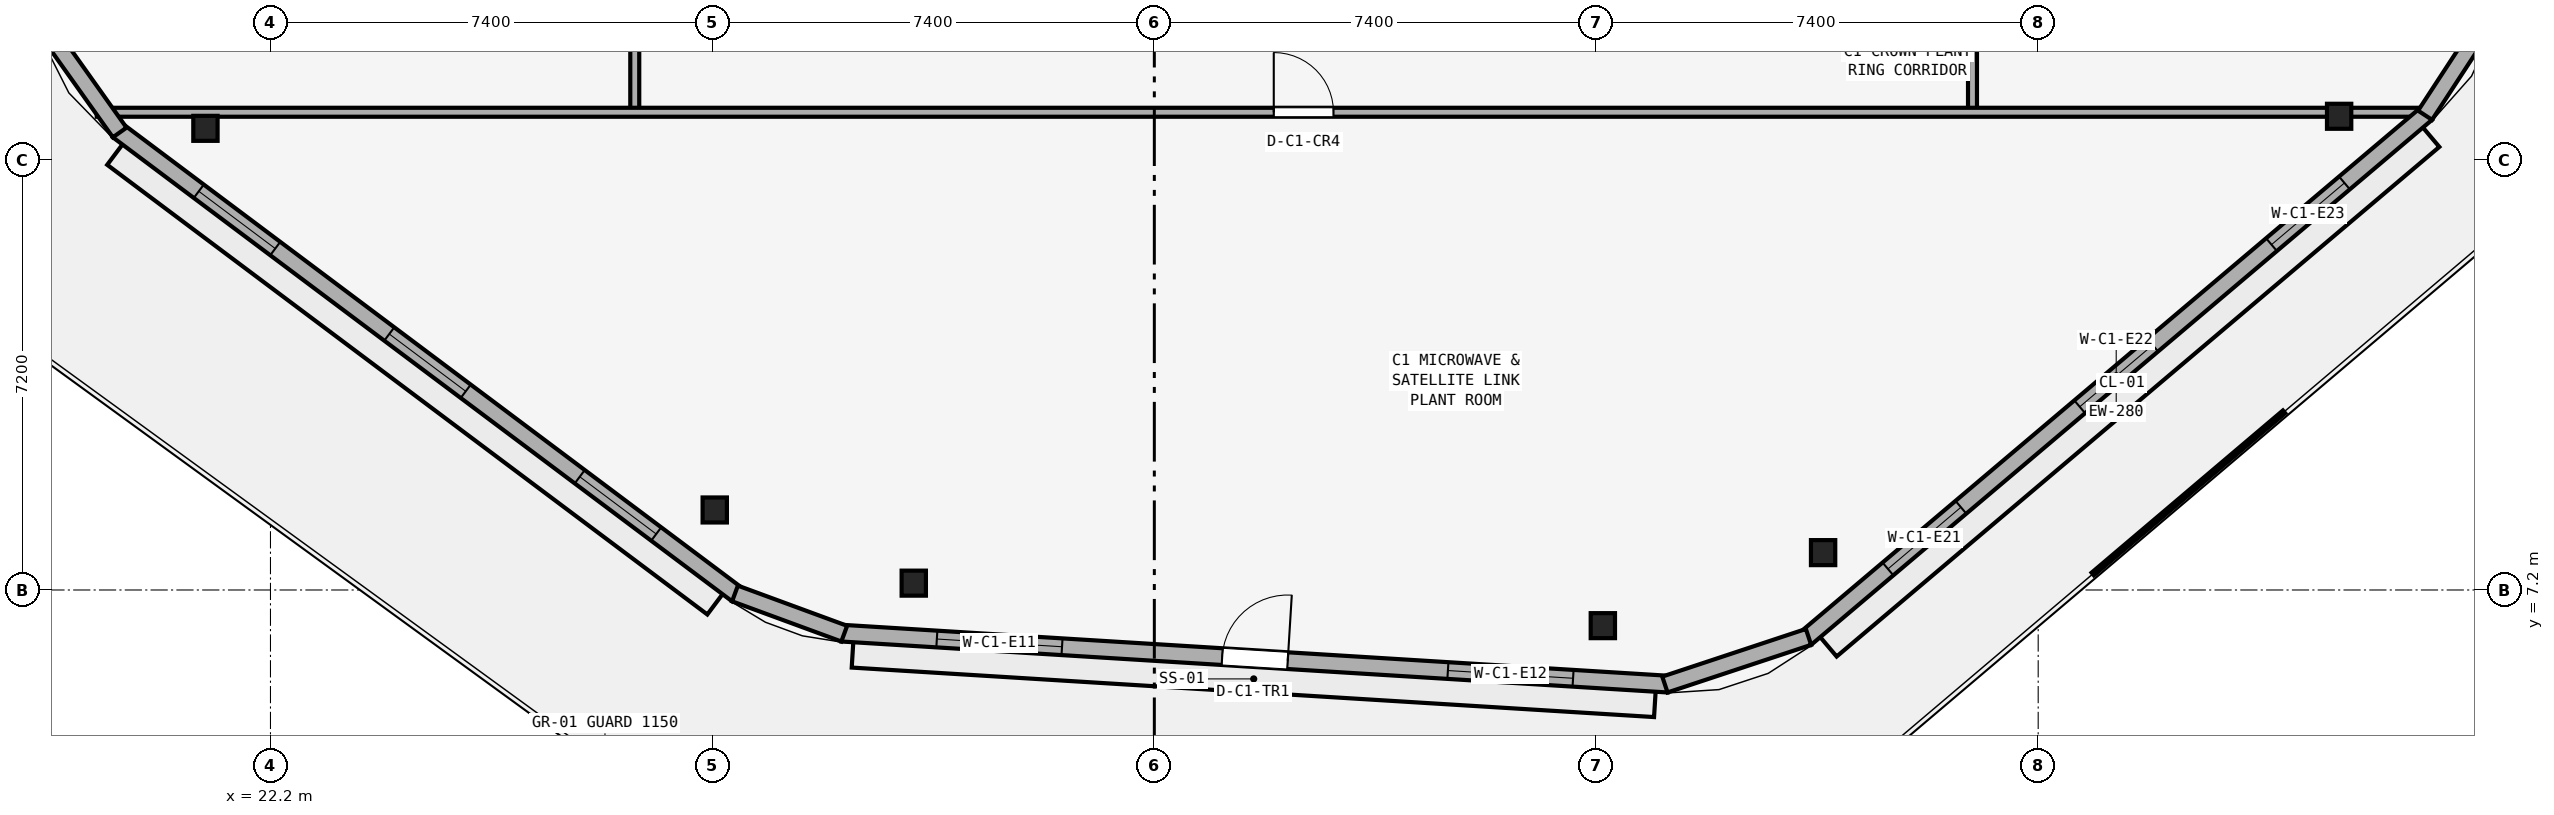
"""IFC4 building model, lengths in metres.
Left out: names, types, materials, properties, quantities, classifications, styles, units other than length and angle.
Written with IfcOpenShell. Run it as: python <this file> out.ifc"""

import sys

from ifc_helpers import new_model, si_unit, direction, frame, frame_2d, origin, origin_2d, place, context, subcontext, project, spatial, rectangle, i_section, extrude, element, fill, save


model = new_model("IFC4")
c1 = context("Model", 3, precision=1e-05, world=origin(), true_north=direction((0.0, 1.0)))
c2 = subcontext(c1, "Body", "Model", "MODEL_VIEW")
j1 = project(units=[si_unit("LENGTHUNIT", "METRE"), si_unit("PLANEANGLEUNIT", "RADIAN")], contexts=[c1])
p1 = place(None, origin())
s1 = spatial("IfcSite", under=j1, at=p1, CompositionType="ELEMENT")
p2 = place(p1, origin())
s2 = spatial("IfcBuilding", under=s1, at=p2, CompositionType="ELEMENT")
p3 = place(p2, frame((0.0, 0.0, 313.4)))
s3 = spatial("IfcBuildingStorey", under=s2, at=p3, CompositionType="ELEMENT", Elevation=313.4)
for number, where, z_axis, x_axis in (
    (1, (32.972, 7.315, 0.0), (0.0, 0.0, 1.0), (1.0, 0.0, 0.0)),
    (2, (44.51, 6.603, 0.0), (0.0, 0.0, 1.0), (1.0, 0.0, 0.0)),
    (3, (48.198, 7.826, 0.0), (0.0, 0.0, 1.0), (1.0, 0.0, 0.0)),
    (4, (56.839, 15.133, 0.0), (0.0, 0.0, 1.0), (1.0, 0.0, 0.0)),
    (5, (21.111, 14.931, 0.0), (0.0, 0.0, 1.0), (1.0, 0.0, 0.0)),
    (6, (29.639, 8.54, 0.0), (0.0, 0.0, 1.0), (1.0, 0.0, 0.0)),
):
    element("IfcColumn", number, at=place(p3, frame(where, z_axis=z_axis, x_axis=x_axis)), inside=s3, PredefinedType="COLUMN", context=c2, shape_type="SweptSolid", body=[
        extrude(i_section(OverallWidth=0.407, OverallDepth=0.419, WebThickness=0.031, FlangeThickness=0.049, at=origin_2d()), origin(), (0.0, 0.0, 1.0), 4.0),
    ])
p4 = place(p3, frame((50.7, 15.2, 0.0), z_axis=(0.0, 0.0, 1.0), x_axis=(0.0, 1.0, 0.0)))
e7 = element("IfcWall", 7, at=p4, inside=s3, PredefinedType="PARTITIONING", context=c2, shape_type="SweptSolid", body=[
    extrude(rectangle(XDim=20.0, YDim=0.15, at=frame_2d((10.0, 0.0))), origin(), (0.0, 0.0, 1.0), 3.72),
])
p5 = place(p4, frame((9.5, 0.0, 0.0)))
e8 = element("IfcOpeningElement", 8, at=p5, cuts=e7, PredefinedType="OPENING", context=c2, shape_type="SweptSolid", body=[
    extrude(rectangle(XDim=1.0, YDim=2.12, at=frame_2d((0.5, 1.06))), frame((0.0, 0.085, 0.0), z_axis=(0.0, -1.0, 0.0), x_axis=(1.0, 0.0, 0.0)), (0.0, 0.0, 1.0), 0.17),
])
p6 = place(p3, frame((28.3, 15.2, 0.0), z_axis=(0.0, 0.0, 1.0), x_axis=(0.0, 1.0, 0.0)))
e9 = element("IfcWall", 9, at=p6, inside=s3, PredefinedType="PARTITIONING", context=c2, shape_type="SweptSolid", body=[
    extrude(rectangle(XDim=20.0, YDim=0.15, at=frame_2d((10.0, 0.0))), origin(), (0.0, 0.0, 1.0), 3.72),
])
p7 = place(p6, frame((9.5, 0.0, 0.0)))
e10 = element("IfcOpeningElement", 10, at=p7, cuts=e9, PredefinedType="OPENING", context=c2, shape_type="SweptSolid", body=[
    extrude(rectangle(XDim=1.0, YDim=2.12, at=frame_2d((0.5, 1.06))), frame((0.0, 0.085, 0.0), z_axis=(0.0, -1.0, 0.0), x_axis=(1.0, 0.0, 0.0)), (0.0, 0.0, 1.0), 0.17),
])
p8 = place(p3, frame((19.292, 15.2, 0.0), z_axis=(0.0, 0.0, 1.0), x_axis=(1.0, 0.0, 0.0)))
e11 = element("IfcWall", 11, at=p8, inside=s3, PredefinedType="PARTITIONING", context=c2, shape_type="SweptSolid", body=[
    extrude(rectangle(XDim=39.076, YDim=0.15, at=frame_2d((19.538, 0.0))), origin(), (0.0, 0.0, 1.0), 3.103),
])
p9 = place(p8, frame((19.708, 0.0, 0.0)))
e12 = element("IfcOpeningElement", 12, at=p9, cuts=e11, PredefinedType="OPENING", context=c2, shape_type="SweptSolid", body=[
    extrude(rectangle(XDim=1.0, YDim=2.12, at=frame_2d((0.5, 1.06))), frame((0.0, 0.085, 0.0), z_axis=(0.0, -1.0, 0.0), x_axis=(1.0, 0.0, 0.0)), (0.0, 0.0, 1.0), 0.17),
])
p10 = place(p3, frame((31.768, 6.477, 0.0), z_axis=(0.0, 0.0, 1.0), x_axis=(0.998103304461, -0.061561299728, 0.0)))
e13 = element("IfcWall", 13, at=p10, inside=s3, PredefinedType="STANDARD", context=c2, shape_type="SweptSolid", body=[
    extrude(rectangle(XDim=13.861, YDim=0.28, at=frame_2d((6.93, 0.0))), origin(), (0.0, 0.0, 1.0), 3.72),
])
p11 = place(p10, frame((6.38, 0.0, 0.0)))
e14 = element("IfcOpeningElement", 14, at=p11, cuts=e13, PredefinedType="OPENING", context=c2, shape_type="SweptSolid", body=[
    extrude(rectangle(XDim=1.1, YDim=2.2, at=frame_2d((0.55, 1.1))), frame((0.0, 0.15, 0.0), z_axis=(0.0, -1.0, 0.0), x_axis=(1.0, 0.0, 0.0)), (0.0, 0.0, 1.0), 0.3),
])
p12 = place(p10, frame((1.594, 0.0, 0.9)))
e15 = element("IfcOpeningElement", 15, at=p12, cuts=e13, PredefinedType="OPENING", context=c2, shape_type="SweptSolid", body=[
    extrude(rectangle(XDim=2.1, YDim=1.7, at=frame_2d((1.05, 0.85))), frame((0.0, 0.15, 0.0), z_axis=(0.0, -1.0, 0.0), x_axis=(1.0, 0.0, 0.0)), (0.0, 0.0, 1.0), 0.3),
])
p13 = place(p10, frame((10.167, 0.0, 0.9)))
e16 = element("IfcOpeningElement", 16, at=p13, cuts=e13, PredefinedType="OPENING", context=c2, shape_type="SweptSolid", body=[
    extrude(rectangle(XDim=2.1, YDim=1.7, at=frame_2d((1.05, 0.85))), frame((0.0, 0.15, 0.0), z_axis=(0.0, -1.0, 0.0), x_axis=(1.0, 0.0, 0.0)), (0.0, 0.0, 1.0), 0.3),
])
p14 = place(p3, frame((47.908, 6.388, 0.0), z_axis=(0.0, 0.0, 1.0), x_axis=(0.763574643448, 0.645719570621, 0.0)))
e17 = element("IfcWall", 17, at=p14, inside=s3, PredefinedType="STANDARD", context=c2, shape_type="SweptSolid", body=[
    extrude(rectangle(XDim=13.616, YDim=0.28, at=frame_2d((6.808, 0.0))), origin(), (0.0, 0.0, 1.0), 3.72),
])
p15 = place(p14, frame((1.803, 0.0, 0.9)))
e18 = element("IfcOpeningElement", 18, at=p15, cuts=e17, PredefinedType="OPENING", context=c2, shape_type="SweptSolid", body=[
    extrude(rectangle(XDim=1.6, YDim=1.45, at=frame_2d((0.8, 0.725))), frame((0.0, 0.15, 0.0), z_axis=(0.0, -1.0, 0.0), x_axis=(1.0, 0.0, 0.0)), (0.0, 0.0, 1.0), 0.3),
])
p16 = place(p14, frame((6.008, 0.0, 0.9)))
e19 = element("IfcOpeningElement", 19, at=p16, cuts=e17, PredefinedType="OPENING", context=c2, shape_type="SweptSolid", body=[
    extrude(rectangle(XDim=1.6, YDim=1.45, at=frame_2d((0.8, 0.725))), frame((0.0, 0.15, 0.0), z_axis=(0.0, -1.0, 0.0), x_axis=(1.0, 0.0, 0.0)), (0.0, 0.0, 1.0), 0.3),
])
p17 = place(p14, frame((10.213, 0.0, 0.9)))
e20 = element("IfcOpeningElement", 20, at=p17, cuts=e17, PredefinedType="OPENING", context=c2, shape_type="SweptSolid", body=[
    extrude(rectangle(XDim=1.6, YDim=1.45, at=frame_2d((0.8, 0.725))), frame((0.0, 0.15, 0.0), z_axis=(0.0, -1.0, 0.0), x_axis=(1.0, 0.0, 0.0)), (0.0, 0.0, 1.0), 0.3),
])
p18 = place(p3, frame((19.645, 14.892, 0.0), z_axis=(0.0, 0.0, 1.0), x_axis=(0.800246388275, -0.599671341697, 0.0)))
e21 = element("IfcWall", 21, at=p18, inside=s3, PredefinedType="STANDARD", context=c2, shape_type="SweptSolid", body=[
    extrude(rectangle(XDim=12.957, YDim=0.28, at=frame_2d((6.479, 0.0))), origin(), (0.0, 0.0, 1.0), 3.72),
])
p19 = place(p18, frame((1.693, 0.0, 0.9)))
e22 = element("IfcOpeningElement", 22, at=p19, cuts=e21, PredefinedType="OPENING", context=c2, shape_type="SweptSolid", body=[
    extrude(rectangle(XDim=1.6, YDim=1.45, at=frame_2d((0.8, 0.725))), frame((0.0, 0.15, 0.0), z_axis=(0.0, -1.0, 0.0), x_axis=(1.0, 0.0, 0.0)), (0.0, 0.0, 1.0), 0.3),
])
p20 = place(p18, frame((5.678, 0.0, 0.9)))
e23 = element("IfcOpeningElement", 23, at=p20, cuts=e21, PredefinedType="OPENING", context=c2, shape_type="SweptSolid", body=[
    extrude(rectangle(XDim=1.6, YDim=1.45, at=frame_2d((0.8, 0.725))), frame((0.0, 0.15, 0.0), z_axis=(0.0, -1.0, 0.0), x_axis=(1.0, 0.0, 0.0)), (0.0, 0.0, 1.0), 0.3),
])
p21 = place(p18, frame((9.664, 0.0, 0.9)))
e24 = element("IfcOpeningElement", 24, at=p21, cuts=e21, PredefinedType="OPENING", context=c2, shape_type="SweptSolid", body=[
    extrude(rectangle(XDim=1.6, YDim=1.45, at=frame_2d((0.8, 0.725))), frame((0.0, 0.15, 0.0), z_axis=(0.0, -1.0, 0.0), x_axis=(1.0, 0.0, 0.0)), (0.0, 0.0, 1.0), 0.3),
])
p22 = place(p3, frame((45.55, 5.617, 0.0), z_axis=(0.0, 0.0, 1.0), x_axis=(0.949173652387, 0.314752883409, 0.0)))
e25 = element("IfcWall", 25, at=p22, inside=s3, PredefinedType="STANDARD", context=c2, shape_type="SweptSolid", body=[
    extrude(rectangle(XDim=2.533, YDim=0.28, at=frame_2d((1.267, 0.0))), origin(), (0.0, 0.0, 1.0), 3.72),
])
p23 = place(p3, frame((58.278, 15.15, 0.0), z_axis=(0.0, 0.0, 1.0), x_axis=(0.547367908429, 0.836892091504, 0.0)))
e26 = element("IfcWall", 26, at=p23, inside=s3, PredefinedType="STANDARD", context=c2, shape_type="SweptSolid", body=[
    extrude(rectangle(XDim=1.942, YDim=0.28, at=frame_2d((0.971, 0.0))), origin(), (0.0, 0.0, 1.0), 3.72),
])
p24 = place(p3, frame((18.475, 16.547, 0.0), z_axis=(0.0, 0.0, 1.0), x_axis=(0.579786647816, -0.814768337022, 0.0)))
e27 = element("IfcWall", 27, at=p24, inside=s3, PredefinedType="STANDARD", context=c2, shape_type="SweptSolid", body=[
    extrude(rectangle(XDim=2.07, YDim=0.28, at=frame_2d((1.035, 0.0))), origin(), (0.0, 0.0, 1.0), 3.72),
])
p25 = place(p3, frame((29.978, 7.142, 0.0), z_axis=(0.0, 0.0, 1.0), x_axis=(0.938529029107, -0.345200320862, 0.0)))
e28 = element("IfcWall", 28, at=p25, inside=s3, PredefinedType="STANDARD", context=c2, shape_type="SweptSolid", body=[
    extrude(rectangle(XDim=1.949, YDim=0.28, at=frame_2d((0.975, 0.0))), origin(), (0.0, 0.0, 1.0), 3.72),
])
p26 = place(p9, origin())
e29 = element("IfcDoor", 29, at=p26, inside=s3, OperationType="SINGLE_SWING_LEFT", PredefinedType="DOOR", context=c2, shape_type="SweptSolid", body=[
    extrude(rectangle(XDim=1.0, YDim=2.12, at=frame_2d((0.5, 1.06))), frame((0.0, 0.025, 0.0), z_axis=(0.0, -1.0, 0.0), x_axis=(1.0, 0.0, 0.0)), (0.0, 0.0, 1.0), 0.05),
])
fill(e12, e29)
p27 = place(p11, origin())
e30 = element("IfcDoor", 30, at=p27, inside=s3, OperationType="SINGLE_SWING_RIGHT", PredefinedType="DOOR", context=c2, shape_type="SweptSolid", body=[
    extrude(rectangle(XDim=1.1, YDim=2.2, at=frame_2d((0.55, 1.1))), frame((0.0, 0.025, 0.0), z_axis=(0.0, -1.0, 0.0), x_axis=(1.0, 0.0, 0.0)), (0.0, 0.0, 1.0), 0.05),
])
fill(e14, e30)
p28 = place(p12, origin())
e31 = element("IfcWindow", 31, at=p28, inside=s3, PartitioningType="SINGLE_PANEL", PredefinedType="WINDOW", context=c2, shape_type="SweptSolid", body=[
    extrude(rectangle(XDim=2.1, YDim=1.7, at=frame_2d((1.05, 0.85))), frame((0.0, 0.03, 0.0), z_axis=(0.0, -1.0, 0.0), x_axis=(1.0, 0.0, 0.0)), (0.0, 0.0, 1.0), 0.06),
])
fill(e15, e31)
p29 = place(p13, origin())
e32 = element("IfcWindow", 32, at=p29, inside=s3, PartitioningType="SINGLE_PANEL", PredefinedType="WINDOW", context=c2, shape_type="SweptSolid", body=[
    extrude(rectangle(XDim=2.1, YDim=1.7, at=frame_2d((1.05, 0.85))), frame((0.0, 0.03, 0.0), z_axis=(0.0, -1.0, 0.0), x_axis=(1.0, 0.0, 0.0)), (0.0, 0.0, 1.0), 0.06),
])
fill(e16, e32)
p30 = place(p15, origin())
e33 = element("IfcWindow", 33, at=p30, inside=s3, PartitioningType="SINGLE_PANEL", PredefinedType="WINDOW", context=c2, shape_type="SweptSolid", body=[
    extrude(rectangle(XDim=1.6, YDim=1.45, at=frame_2d((0.8, 0.725))), frame((0.0, 0.03, 0.0), z_axis=(0.0, -1.0, 0.0), x_axis=(1.0, 0.0, 0.0)), (0.0, 0.0, 1.0), 0.06),
])
fill(e18, e33)
p31 = place(p16, origin())
e34 = element("IfcWindow", 34, at=p31, inside=s3, PartitioningType="SINGLE_PANEL", PredefinedType="WINDOW", context=c2, shape_type="SweptSolid", body=[
    extrude(rectangle(XDim=1.6, YDim=1.45, at=frame_2d((0.8, 0.725))), frame((0.0, 0.03, 0.0), z_axis=(0.0, -1.0, 0.0), x_axis=(1.0, 0.0, 0.0)), (0.0, 0.0, 1.0), 0.06),
])
fill(e19, e34)
p32 = place(p17, origin())
e35 = element("IfcWindow", 35, at=p32, inside=s3, PartitioningType="SINGLE_PANEL", PredefinedType="WINDOW", context=c2, shape_type="SweptSolid", body=[
    extrude(rectangle(XDim=1.6, YDim=1.45, at=frame_2d((0.8, 0.725))), frame((0.0, 0.03, 0.0), z_axis=(0.0, -1.0, 0.0), x_axis=(1.0, 0.0, 0.0)), (0.0, 0.0, 1.0), 0.06),
])
fill(e20, e35)
p33 = place(p19, origin())
e36 = element("IfcWindow", 36, at=p33, inside=s3, PartitioningType="SINGLE_PANEL", PredefinedType="WINDOW", context=c2, shape_type="SweptSolid", body=[
    extrude(rectangle(XDim=1.6, YDim=1.45, at=frame_2d((0.8, 0.725))), frame((0.0, 0.03, 0.0), z_axis=(0.0, -1.0, 0.0), x_axis=(1.0, 0.0, 0.0)), (0.0, 0.0, 1.0), 0.06),
])
fill(e22, e36)
p34 = place(p20, origin())
e37 = element("IfcWindow", 37, at=p34, inside=s3, PartitioningType="SINGLE_PANEL", PredefinedType="WINDOW", context=c2, shape_type="SweptSolid", body=[
    extrude(rectangle(XDim=1.6, YDim=1.45, at=frame_2d((0.8, 0.725))), frame((0.0, 0.03, 0.0), z_axis=(0.0, -1.0, 0.0), x_axis=(1.0, 0.0, 0.0)), (0.0, 0.0, 1.0), 0.06),
])
fill(e23, e37)
p35 = place(p21, origin())
e38 = element("IfcWindow", 38, at=p35, inside=s3, PartitioningType="SINGLE_PANEL", PredefinedType="WINDOW", context=c2, shape_type="SweptSolid", body=[
    extrude(rectangle(XDim=1.6, YDim=1.45, at=frame_2d((0.8, 0.725))), frame((0.0, 0.03, 0.0), z_axis=(0.0, -1.0, 0.0), x_axis=(1.0, 0.0, 0.0)), (0.0, 0.0, 1.0), 0.06),
])
fill(e24, e38)
save(model, sys.argv[1])
